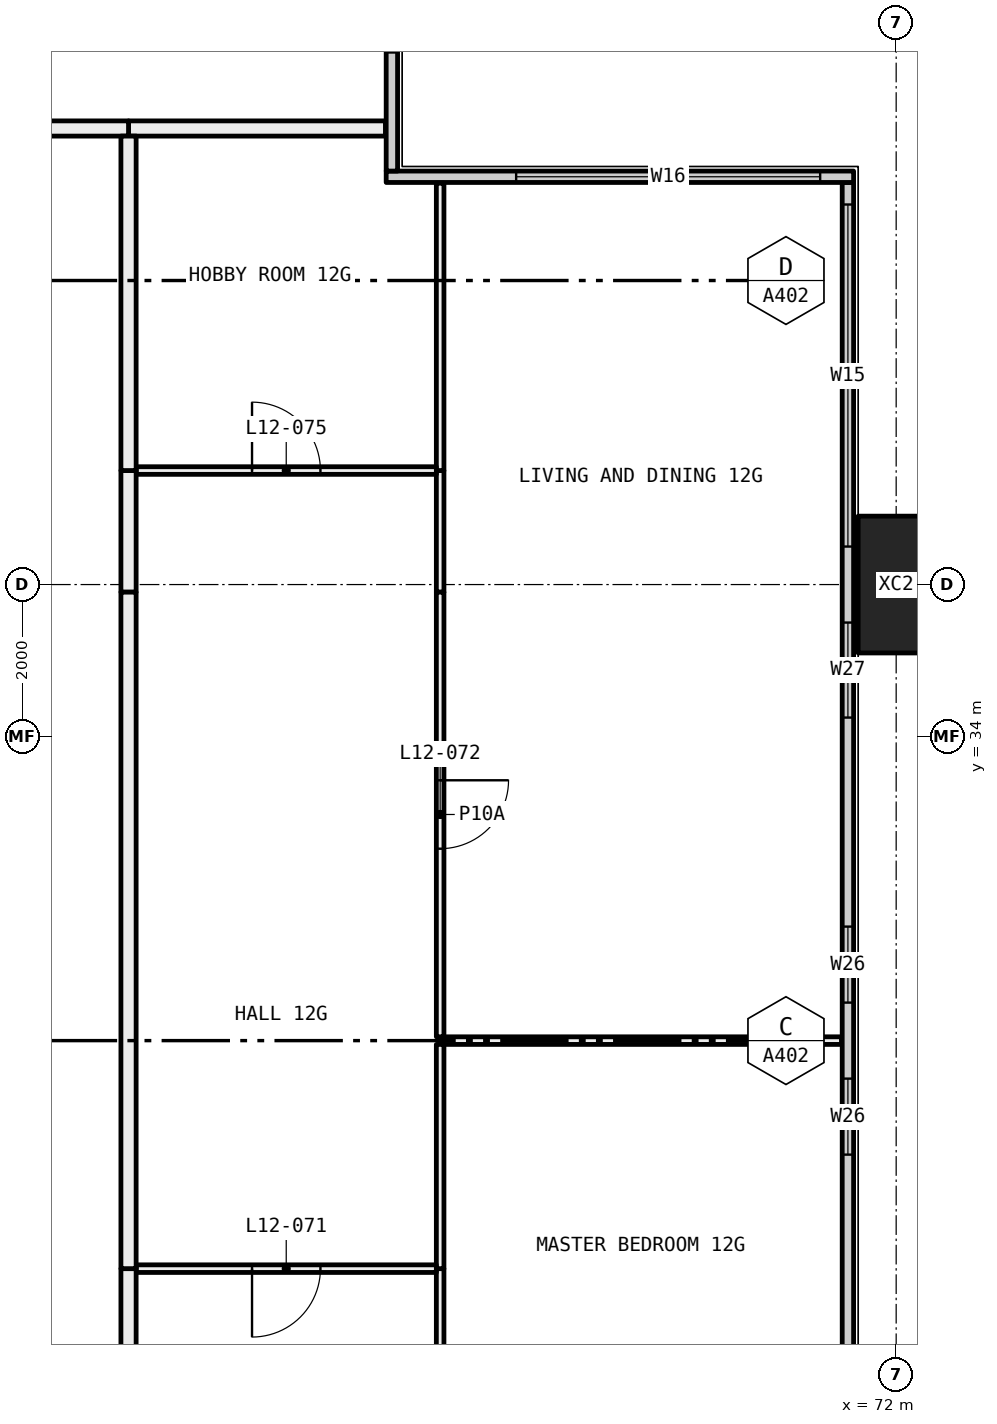
"""IFC4 building model, lengths in metres.
Left out: names, types, materials, properties, quantities, classifications, styles, units other than length and angle.
Written with IfcOpenShell. Run it as: python <this file> out.ifc"""

import sys

from ifc_helpers import new_model, si_unit, direction, frame, frame_2d, origin, origin_2d, place, context, subcontext, project, spatial, rectangle, hollow_rectangle, extrude, element, fill, save


model = new_model("IFC4")
c1 = context("Model", 3, precision=1e-05, world=origin(), true_north=direction((0.0, 1.0)))
c2 = subcontext(c1, "Body", "Model", "MODEL_VIEW")
j1 = project(units=[si_unit("LENGTHUNIT", "METRE"), si_unit("PLANEANGLEUNIT", "RADIAN")], contexts=[c1])
p1 = place(None, origin())
s1 = spatial("IfcSite", under=j1, at=p1, CompositionType="ELEMENT")
p2 = place(p1, origin())
s2 = spatial("IfcBuilding", under=s1, at=p2, CompositionType="ELEMENT")
p3 = place(p2, frame((0.0, 0.0, 54.15)))
s3 = spatial("IfcBuildingStorey", under=s2, at=p3, CompositionType="ELEMENT", Elevation=54.15)
p4 = place(p3, frame((72.0, 36.0, -0.4), z_axis=(0.0, 0.0, 1.0), x_axis=(0.0, 1.0, 0.0)))
e1 = element("IfcColumn", 1, at=p4, inside=s3, PredefinedType="COLUMN", context=c2, shape_type="SweptSolid", body=[
    extrude(hollow_rectangle(XDim=1.8, YDim=1.0, WallThickness=0.07, at=origin_2d()), origin(), (0.0, 0.0, 1.0), 3.45),
])
p5 = place(p3, frame((71.365, 6.71, 0.0), z_axis=(0.0, 0.0, 1.0), x_axis=(0.0, 1.0, 0.0)))
e2 = element("IfcWall", 2, at=p5, inside=s3, PredefinedType="ELEMENTEDWALL", context=c2, shape_type="SweptSolid", body=[
    extrude(rectangle(XDim=34.58, YDim=0.15, at=frame_2d((17.29, 0.0))), origin(), (0.0, 0.0, 1.0), 3.05),
])
p6 = place(p5, frame((0.29, 0.0, 0.45)))
e3 = element("IfcOpeningElement", 3, at=p6, cuts=e2, PredefinedType="OPENING", context=c2, shape_type="SweptSolid", body=[
    extrude(rectangle(XDim=4.5, YDim=2.55, at=frame_2d((2.25, 1.275))), frame((0.0, 0.085, 0.0), z_axis=(0.0, -1.0, 0.0), x_axis=(1.0, 0.0, 0.0)), (0.0, 0.0, 1.0), 0.17),
])
p7 = place(p5, frame((5.79, 0.0, 0.45)))
e4 = element("IfcOpeningElement", 4, at=p7, cuts=e2, PredefinedType="OPENING", context=c2, shape_type="SweptSolid", body=[
    extrude(rectangle(XDim=1.25, YDim=2.55, at=frame_2d((0.625, 1.275))), frame((0.0, 0.085, 0.0), z_axis=(0.0, -1.0, 0.0), x_axis=(1.0, 0.0, 0.0)), (0.0, 0.0, 1.0), 0.17),
])
p8 = place(p5, frame((9.79, 0.0, 0.45)))
e5 = element("IfcOpeningElement", 5, at=p8, cuts=e2, PredefinedType="OPENING", context=c2, shape_type="SweptSolid", body=[
    extrude(rectangle(XDim=1.0, YDim=2.55, at=frame_2d((0.5, 1.275))), frame((0.0, 0.085, 0.0), z_axis=(0.0, -1.0, 0.0), x_axis=(1.0, 0.0, 0.0)), (0.0, 0.0, 1.0), 0.17),
])
p9 = place(p5, frame((11.79, 0.0, 0.45)))
e6 = element("IfcOpeningElement", 6, at=p9, cuts=e2, PredefinedType="OPENING", context=c2, shape_type="SweptSolid", body=[
    extrude(rectangle(XDim=1.0, YDim=2.55, at=frame_2d((0.5, 1.275))), frame((0.0, 0.085, 0.0), z_axis=(0.0, -1.0, 0.0), x_axis=(1.0, 0.0, 0.0)), (0.0, 0.0, 1.0), 0.17),
])
p10 = place(p5, frame((15.54, 0.0, 0.45)))
e7 = element("IfcOpeningElement", 7, at=p10, cuts=e2, PredefinedType="OPENING", context=c2, shape_type="SweptSolid", body=[
    extrude(rectangle(XDim=1.25, YDim=2.55, at=frame_2d((0.625, 1.275))), frame((0.0, 0.085, 0.0), z_axis=(0.0, -1.0, 0.0), x_axis=(1.0, 0.0, 0.0)), (0.0, 0.0, 1.0), 0.17),
])
p11 = place(p5, frame((17.79, 0.0, 0.45)))
e8 = element("IfcOpeningElement", 8, at=p11, cuts=e2, PredefinedType="OPENING", context=c2, shape_type="SweptSolid", body=[
    extrude(rectangle(XDim=1.25, YDim=2.55, at=frame_2d((0.625, 1.275))), frame((0.0, 0.085, 0.0), z_axis=(0.0, -1.0, 0.0), x_axis=(1.0, 0.0, 0.0)), (0.0, 0.0, 1.0), 0.17),
])
p12 = place(p5, frame((21.79, 0.0, 0.45)))
e9 = element("IfcOpeningElement", 9, at=p12, cuts=e2, PredefinedType="OPENING", context=c2, shape_type="SweptSolid", body=[
    extrude(rectangle(XDim=1.0, YDim=2.55, at=frame_2d((0.5, 1.275))), frame((0.0, 0.085, 0.0), z_axis=(0.0, -1.0, 0.0), x_axis=(1.0, 0.0, 0.0)), (0.0, 0.0, 1.0), 0.17),
])
p13 = place(p5, frame((23.79, 0.0, 0.45)))
e10 = element("IfcOpeningElement", 10, at=p13, cuts=e2, PredefinedType="OPENING", context=c2, shape_type="SweptSolid", body=[
    extrude(rectangle(XDim=1.0, YDim=2.55, at=frame_2d((0.5, 1.275))), frame((0.0, 0.085, 0.0), z_axis=(0.0, -1.0, 0.0), x_axis=(1.0, 0.0, 0.0)), (0.0, 0.0, 1.0), 0.17),
])
p14 = place(p5, frame((27.54, 0.0, 0.45)))
e11 = element("IfcOpeningElement", 11, at=p14, cuts=e2, PredefinedType="OPENING", context=c2, shape_type="SweptSolid", body=[
    extrude(rectangle(XDim=1.25, YDim=2.55, at=frame_2d((0.625, 1.275))), frame((0.0, 0.085, 0.0), z_axis=(0.0, -1.0, 0.0), x_axis=(1.0, 0.0, 0.0)), (0.0, 0.0, 1.0), 0.17),
])
p15 = place(p5, frame((29.79, 0.0, 0.45)))
e12 = element("IfcOpeningElement", 12, at=p15, cuts=e2, PredefinedType="OPENING", context=c2, shape_type="SweptSolid", body=[
    extrude(rectangle(XDim=4.5, YDim=2.55, at=frame_2d((2.25, 1.275))), frame((0.0, 0.085, 0.0), z_axis=(0.0, -1.0, 0.0), x_axis=(1.0, 0.0, 0.0)), (0.0, 0.0, 1.0), 0.17),
])
p16 = place(p3, frame((65.29, 41.365, 0.0), z_axis=(0.0, 0.0, 1.0), x_axis=(1.0, 0.0, 0.0)))
e13 = element("IfcWall", 13, at=p16, inside=s3, PredefinedType="ELEMENTEDWALL", context=c2, shape_type="SweptSolid", body=[
    extrude(rectangle(XDim=6.15, YDim=0.15, at=frame_2d((3.075, 0.0))), origin(), (0.0, 0.0, 1.0), 3.05),
])
p17 = place(p16, frame((1.71, 0.0, 0.45)))
e14 = element("IfcOpeningElement", 14, at=p17, cuts=e13, PredefinedType="OPENING", context=c2, shape_type="SweptSolid", body=[
    extrude(rectangle(XDim=4.0, YDim=2.55, at=frame_2d((2.0, 1.275))), frame((0.0, 0.085, 0.0), z_axis=(0.0, -1.0, 0.0), x_axis=(1.0, 0.0, 0.0)), (0.0, 0.0, 1.0), 0.17),
])
p18 = place(p3, frame((65.365, 41.44, 0.0), z_axis=(0.0, 0.0, 1.0), x_axis=(0.0, 1.0, 0.0)))
e15 = element("IfcWall", 15, at=p18, inside=s3, PredefinedType="ELEMENTEDWALL", context=c2, shape_type="SweptSolid", body=[
    extrude(rectangle(XDim=5.85, YDim=0.15, at=frame_2d((2.925, 0.0))), origin(), (0.0, 0.0, 1.0), 3.05),
])
p19 = place(p18, frame((1.56, 0.0, 0.45)))
e16 = element("IfcOpeningElement", 16, at=p19, cuts=e15, PredefinedType="OPENING", context=c2, shape_type="SweptSolid", body=[
    extrude(rectangle(XDim=4.0, YDim=2.55, at=frame_2d((2.0, 1.275))), frame((0.0, 0.085, 0.0), z_axis=(0.0, -1.0, 0.0), x_axis=(1.0, 0.0, 0.0)), (0.0, 0.0, 1.0), 0.17),
])
p20 = place(p3, frame((61.9, 42.0, 0.0), z_axis=(0.0, 0.0, 1.0), x_axis=(1.0, 0.0, 0.0)))
e17 = element("IfcWall", 17, at=p20, inside=s3, PredefinedType="PARTITIONING", context=c2, shape_type="SweptSolid", body=[
    extrude(rectangle(XDim=3.38, YDim=0.2, at=frame_2d((1.69, 0.0))), origin(), (0.0, 0.0, 1.0), 3.05),
])
p21 = place(p3, frame((60.0, 42.0, 0.0), z_axis=(0.0, 0.0, 1.0), x_axis=(1.0, 0.0, 0.0)))
e18 = element("IfcWall", 18, at=p21, inside=s3, PredefinedType="PARTITIONING", context=c2, shape_type="SweptSolid", body=[
    extrude(rectangle(XDim=1.9, YDim=0.2, at=frame_2d((0.95, 0.0))), origin(), (0.0, 0.0, 1.0), 3.05),
])
p22 = place(p3, frame((71.28, 30.0, 0.0), z_axis=(0.0, 0.0, 1.0), x_axis=(-1.0, 0.0, 0.0)))
e19 = element("IfcWall", 19, at=p22, inside=s3, PredefinedType="PARTITIONING", context=c2, shape_type="SweptSolid", body=[
    extrude(rectangle(XDim=5.28, YDim=0.1, at=frame_2d((2.64, 0.0))), origin(), (0.0, 0.0, 1.0), 3.05),
])
p23 = place(p3, frame((66.0, 27.0, 0.0), z_axis=(0.0, 0.0, 1.0), x_axis=(0.0, -1.0, 0.0)))
e20 = element("IfcWall", 20, at=p23, inside=s3, PredefinedType="PARTITIONING", context=c2, shape_type="SweptSolid", body=[
    extrude(rectangle(XDim=2.95, YDim=0.1, at=frame_2d((1.475, 0.0))), origin(), (0.0, 0.0, 1.0), 2.45),
])
p24 = place(p3, frame((66.0, 29.95, 0.0), z_axis=(0.0, 0.0, 1.0), x_axis=(0.0, -1.0, 0.0)))
e21 = element("IfcWall", 21, at=p24, inside=s3, PredefinedType="PARTITIONING", context=c2, shape_type="SweptSolid", body=[
    extrude(rectangle(XDim=2.95, YDim=0.1, at=frame_2d((1.475, 0.0))), origin(), (0.0, 0.0, 1.0), 3.05),
])
p25 = place(p3, frame((66.0, 37.5, 0.0), z_axis=(0.0, 0.0, 1.0), x_axis=(0.0, -1.0, 0.0)))
e22 = element("IfcWall", 22, at=p25, inside=s3, PredefinedType="PARTITIONING", context=c2, shape_type="SweptSolid", body=[
    extrude(rectangle(XDim=1.6, YDim=0.1, at=frame_2d((0.8, 0.0))), origin(), (0.0, 0.0, 1.0), 2.45),
])
p26 = place(p3, frame((66.0, 35.9, 0.0), z_axis=(0.0, 0.0, 1.0), x_axis=(0.0, -1.0, 0.0)))
e23 = element("IfcWall", 23, at=p26, inside=s3, PredefinedType="PARTITIONING", context=c2, shape_type="SweptSolid", body=[
    extrude(rectangle(XDim=5.85, YDim=0.1, at=frame_2d((2.925, 0.0))), origin(), (0.0, 0.0, 1.0), 3.05),
])
p27 = place(p26, frame((2.475, 0.0, 0.0)))
e24 = element("IfcOpeningElement", 24, at=p27, cuts=e23, PredefinedType="OPENING", context=c2, shape_type="SweptSolid", body=[
    extrude(rectangle(XDim=0.9, YDim=2.1, at=frame_2d((0.45, 1.05))), frame((0.0, 0.06, 0.0), z_axis=(0.0, -1.0, 0.0), x_axis=(1.0, 0.0, 0.0)), (0.0, 0.0, 1.0), 0.12),
])
p28 = place(p3, frame((66.0, 41.28, 0.0), z_axis=(0.0, 0.0, 1.0), x_axis=(0.0, -1.0, 0.0)))
e25 = element("IfcWall", 25, at=p28, inside=s3, PredefinedType="PARTITIONING", context=c2, shape_type="SweptSolid", body=[
    extrude(rectangle(XDim=3.78, YDim=0.1, at=frame_2d((1.89, 0.0))), origin(), (0.0, 0.0, 1.0), 3.05),
])
p29 = place(p3, frame((65.95, 27.0, 0.0), z_axis=(0.0, 0.0, 1.0), x_axis=(-1.0, 0.0, 0.0)))
e26 = element("IfcWall", 26, at=p29, inside=s3, PredefinedType="PARTITIONING", context=c2, shape_type="SweptSolid", body=[
    extrude(rectangle(XDim=3.95, YDim=0.1, at=frame_2d((1.975, 0.0))), origin(), (0.0, 0.0, 1.0), 3.05),
])
p30 = place(p29, frame((1.525, 0.0, 0.0)))
e27 = element("IfcOpeningElement", 27, at=p30, cuts=e26, PredefinedType="OPENING", context=c2, shape_type="SweptSolid", body=[
    extrude(rectangle(XDim=0.9, YDim=2.1, at=frame_2d((0.45, 1.05))), frame((0.0, 0.06, 0.0), z_axis=(0.0, -1.0, 0.0), x_axis=(1.0, 0.0, 0.0)), (0.0, 0.0, 1.0), 0.12),
])
p31 = place(p3, frame((61.9, 27.0, 0.0), z_axis=(0.0, 0.0, 1.0), x_axis=(0.0, -1.0, 0.0)))
e28 = element("IfcWall", 28, at=p31, inside=s3, PredefinedType="PARTITIONING", context=c2, shape_type="SweptSolid", body=[
    extrude(rectangle(XDim=3.1, YDim=0.2, at=frame_2d((1.55, 0.0))), origin(), (0.0, 0.0, 1.0), 2.45),
])
p32 = place(p31, frame((1.05, 0.0, 0.0)))
e29 = element("IfcOpeningElement", 29, at=p32, cuts=e28, PredefinedType="OPENING", context=c2, shape_type="SweptSolid", body=[
    extrude(rectangle(XDim=1.0, YDim=2.1, at=frame_2d((0.5, 1.05))), frame((0.0, 0.11, 0.0), z_axis=(0.0, -1.0, 0.0), x_axis=(1.0, 0.0, 0.0)), (0.0, 0.0, 1.0), 0.22),
])
p33 = place(p3, frame((65.95, 37.5, 0.0), z_axis=(0.0, 0.0, 1.0), x_axis=(-1.0, 0.0, 0.0)))
e30 = element("IfcWall", 30, at=p33, inside=s3, PredefinedType="PARTITIONING", context=c2, shape_type="SweptSolid", body=[
    extrude(rectangle(XDim=3.95, YDim=0.1, at=frame_2d((1.975, 0.0))), origin(), (0.0, 0.0, 1.0), 3.05),
])
p34 = place(p33, frame((1.525, 0.0, 0.0)))
e31 = element("IfcOpeningElement", 31, at=p34, cuts=e30, PredefinedType="OPENING", context=c2, shape_type="SweptSolid", body=[
    extrude(rectangle(XDim=0.9, YDim=2.1, at=frame_2d((0.45, 1.05))), frame((0.0, 0.06, 0.0), z_axis=(0.0, -1.0, 0.0), x_axis=(1.0, 0.0, 0.0)), (0.0, 0.0, 1.0), 0.12),
])
p35 = place(p3, frame((61.9, 37.5, 0.0), z_axis=(0.0, 0.0, 1.0), x_axis=(0.0, -1.0, 0.0)))
e32 = element("IfcWall", 32, at=p35, inside=s3, PredefinedType="PARTITIONING", context=c2, shape_type="SweptSolid", body=[
    extrude(rectangle(XDim=1.6, YDim=0.2, at=frame_2d((0.8, 0.0))), origin(), (0.0, 0.0, 1.0), 2.45),
])
p36 = place(p3, frame((61.9, 35.9, 0.0), z_axis=(0.0, 0.0, 1.0), x_axis=(0.0, -1.0, 0.0)))
e33 = element("IfcWall", 33, at=p36, inside=s3, PredefinedType="PARTITIONING", context=c2, shape_type="SweptSolid", body=[
    extrude(rectangle(XDim=8.9, YDim=0.2, at=frame_2d((4.45, 0.0))), origin(), (0.0, 0.0, 1.0), 3.05),
])
p37 = place(p3, frame((61.9, 41.9, 0.0), z_axis=(0.0, 0.0, 1.0), x_axis=(0.0, -1.0, 0.0)))
e34 = element("IfcWall", 34, at=p37, inside=s3, PredefinedType="PARTITIONING", context=c2, shape_type="SweptSolid", body=[
    extrude(rectangle(XDim=4.4, YDim=0.2, at=frame_2d((2.2, 0.0))), origin(), (0.0, 0.0, 1.0), 3.05),
])
p38 = place(p12, origin())
e35 = element("IfcWindow", 35, at=p38, inside=s3, PartitioningType="SINGLE_PANEL", PredefinedType="WINDOW", context=c2, shape_type="SweptSolid", body=[
    extrude(rectangle(XDim=1.0, YDim=2.55, at=frame_2d((0.5, 1.275))), frame((0.0, 0.03, 0.0), z_axis=(0.0, -1.0, 0.0), x_axis=(1.0, 0.0, 0.0)), (0.0, 0.0, 1.0), 0.06),
])
fill(e9, e35)
p39 = place(p13, origin())
e36 = element("IfcWindow", 36, at=p39, inside=s3, PartitioningType="SINGLE_PANEL", PredefinedType="WINDOW", context=c2, shape_type="SweptSolid", body=[
    extrude(rectangle(XDim=1.0, YDim=2.55, at=frame_2d((0.5, 1.275))), frame((0.0, 0.03, 0.0), z_axis=(0.0, -1.0, 0.0), x_axis=(1.0, 0.0, 0.0)), (0.0, 0.0, 1.0), 0.06),
])
fill(e10, e36)
p40 = place(p14, origin())
e37 = element("IfcWindow", 37, at=p40, inside=s3, PartitioningType="SINGLE_PANEL", PredefinedType="WINDOW", context=c2, shape_type="SweptSolid", body=[
    extrude(rectangle(XDim=1.25, YDim=2.55, at=frame_2d((0.625, 1.275))), frame((0.0, 0.03, 0.0), z_axis=(0.0, -1.0, 0.0), x_axis=(1.0, 0.0, 0.0)), (0.0, 0.0, 1.0), 0.06),
])
fill(e11, e37)
p41 = place(p15, origin())
e38 = element("IfcWindow", 38, at=p41, inside=s3, PartitioningType="SINGLE_PANEL", PredefinedType="WINDOW", context=c2, shape_type="SweptSolid", body=[
    extrude(rectangle(XDim=4.5, YDim=2.55, at=frame_2d((2.25, 1.275))), frame((0.0, 0.03, 0.0), z_axis=(0.0, -1.0, 0.0), x_axis=(1.0, 0.0, 0.0)), (0.0, 0.0, 1.0), 0.06),
])
fill(e12, e38)
p42 = place(p17, origin())
e39 = element("IfcWindow", 39, at=p42, inside=s3, PartitioningType="SINGLE_PANEL", PredefinedType="WINDOW", context=c2, shape_type="SweptSolid", body=[
    extrude(rectangle(XDim=4.0, YDim=2.55, at=frame_2d((2.0, 1.275))), frame((0.0, 0.03, 0.0), z_axis=(0.0, -1.0, 0.0), x_axis=(1.0, 0.0, 0.0)), (0.0, 0.0, 1.0), 0.06),
])
fill(e14, e39)
p43 = place(p30, origin())
e40 = element("IfcDoor", 40, at=p43, inside=s3, OperationType="SINGLE_SWING_LEFT", PredefinedType="DOOR", context=c2, shape_type="SweptSolid", body=[
    extrude(rectangle(XDim=0.9, YDim=2.1, at=frame_2d((0.45, 1.05))), frame((0.0, 0.025, 0.0), z_axis=(0.0, -1.0, 0.0), x_axis=(1.0, 0.0, 0.0)), (0.0, 0.0, 1.0), 0.05),
])
fill(e27, e40)
p44 = place(p27, origin())
e41 = element("IfcDoor", 41, at=p44, inside=s3, OperationType="SINGLE_SWING_RIGHT", PredefinedType="DOOR", context=c2, shape_type="SweptSolid", body=[
    extrude(rectangle(XDim=0.9, YDim=2.1, at=frame_2d((0.45, 1.05))), frame((0.0, 0.025, 0.0), z_axis=(0.0, -1.0, 0.0), x_axis=(1.0, 0.0, 0.0)), (0.0, 0.0, 1.0), 0.05),
])
fill(e24, e41)
p45 = place(p34, frame((0.9, 0.0, 0.0), x_axis=(-1.0, 0.0, 0.0)))
e42 = element("IfcDoor", 42, at=p45, inside=s3, OperationType="SINGLE_SWING_RIGHT", PredefinedType="DOOR", context=c2, shape_type="SweptSolid", body=[
    extrude(rectangle(XDim=0.9, YDim=2.1, at=frame_2d((0.45, 1.05))), frame((0.0, 0.025, 0.0), z_axis=(0.0, -1.0, 0.0), x_axis=(1.0, 0.0, 0.0)), (0.0, 0.0, 1.0), 0.05),
])
fill(e31, e42)
save(model, sys.argv[1])
